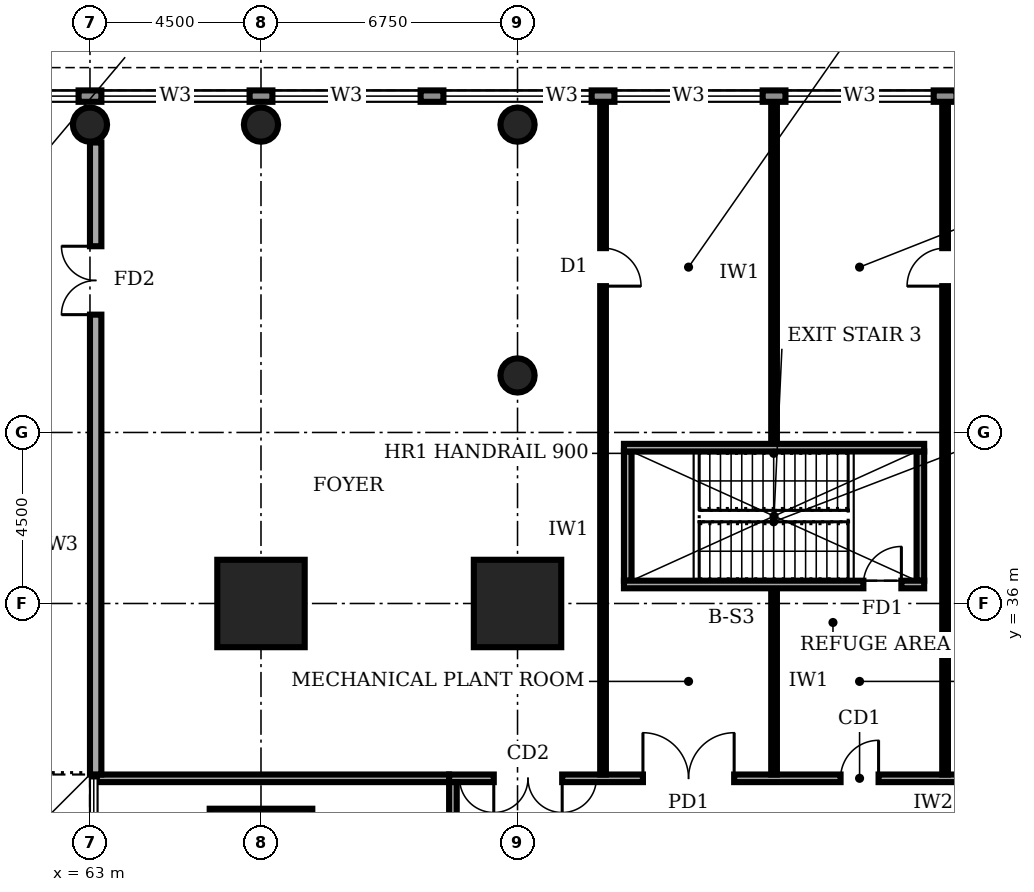
"""IFC4 building model, lengths in metres.
Left out: names, types, materials, properties, quantities, classifications, styles, units other than length and angle.
Written with IfcOpenShell. Run it as: python <this file> out.ifc"""

import sys

from ifc_helpers import new_model, si_unit, direction, frame, frame_2d, origin, origin_2d, place, context, subcontext, project, spatial, rectangle, circle, extrude, element, fill, save


model = new_model("IFC4")
c1 = context("Model", 3, precision=1e-05, world=origin(), true_north=direction((0.0, 1.0)))
c2 = subcontext(c1, "Body", "Model", "MODEL_VIEW")
j1 = project(units=[si_unit("LENGTHUNIT", "METRE"), si_unit("PLANEANGLEUNIT", "RADIAN")], contexts=[c1])
p1 = place(None, origin())
s1 = spatial("IfcSite", under=j1, at=p1, CompositionType="ELEMENT")
p2 = place(p1, origin())
s2 = spatial("IfcBuilding", under=s1, at=p2, CompositionType="ELEMENT")
p3 = place(p2, frame((0.0, 0.0, 16.0)))
s3 = spatial("IfcBuildingStorey", under=s2, at=p3, CompositionType="ELEMENT", Elevation=16.0)
p4 = place(p3, frame((67.5, 29.25, 0.0), z_axis=(0.0, 0.0, 1.0), x_axis=(1.0, 0.0, 0.0)))
e1 = element("IfcColumn", 1, at=p4, inside=s3, PredefinedType="COLUMN", context=c2, shape_type="SweptSolid", body=[
    extrude(rectangle(XDim=2.7, YDim=2.7, at=origin_2d()), origin(), (0.0, 0.0, 1.0), 5.0),
])
for number, where, z_axis, x_axis in (
    (2, (67.5, 36.0, 0.0), (0.0, 0.0, 1.0), (1.0, 0.0, 0.0)),
    (3, (74.25, 36.0, 0.0), (0.0, 0.0, 1.0), (1.0, 0.0, 0.0)),
):
    element("IfcColumn", number, at=place(p3, frame(where, z_axis=z_axis, x_axis=x_axis)), inside=s3, PredefinedType="COLUMN", context=c2, shape_type="SweptSolid", body=[
        extrude(rectangle(XDim=2.3, YDim=2.3, at=origin_2d()), origin(), (0.0, 0.0, 1.0), 5.0),
    ])
for number, where, z_axis, x_axis in (
    (4, (74.25, 42.0, 0.0), (0.0, 0.0, 1.0), (1.0, 0.0, 0.0)),
    (5, (63.0, 48.6, 0.0), (0.0, 0.0, 1.0), (1.0, 0.0, 0.0)),
    (6, (67.5, 48.6, 0.0), (0.0, 0.0, 1.0), (1.0, 0.0, 0.0)),
    (7, (74.25, 48.6, 0.0), (0.0, 0.0, 1.0), (1.0, 0.0, 0.0)),
):
    element("IfcColumn", number, at=place(p3, frame(where, z_axis=z_axis, x_axis=x_axis)), inside=s3, PredefinedType="COLUMN", context=c2, shape_type="SweptSolid", body=[
        extrude(circle(Radius=0.45, at=origin_2d()), origin(), (0.0, 0.0, 1.0), 5.0),
    ])
p5 = place(p3, frame((98.98, 49.35, 0.0), z_axis=(0.0, 0.0, 1.0), x_axis=(-1.0, 0.0, 0.0)))
e8 = element("IfcWall", 8, at=p5, inside=s3, PredefinedType="STANDARD", context=c2, shape_type="SweptSolid", body=[
    extrude(rectangle(XDim=98.96, YDim=0.3, at=frame_2d((49.48, 0.0))), origin(), (0.0, 0.0, 1.0), 4.7),
])
p6 = place(p5, frame((94.78, 0.0, 0.95)))
e9 = element("IfcOpeningElement", 9, at=p6, cuts=e8, PredefinedType="OPENING", context=c2, shape_type="SweptSolid", body=[
    extrude(rectangle(XDim=3.9, YDim=1.8, at=frame_2d((1.95, 0.9))), frame((0.0, 0.16, 0.0), z_axis=(0.0, -1.0, 0.0), x_axis=(1.0, 0.0, 0.0)), (0.0, 0.0, 1.0), 0.32),
])
p7 = place(p5, frame((90.28, 0.0, 0.95)))
e10 = element("IfcOpeningElement", 10, at=p7, cuts=e8, PredefinedType="OPENING", context=c2, shape_type="SweptSolid", body=[
    extrude(rectangle(XDim=3.9, YDim=1.8, at=frame_2d((1.95, 0.9))), frame((0.0, 0.16, 0.0), z_axis=(0.0, -1.0, 0.0), x_axis=(1.0, 0.0, 0.0)), (0.0, 0.0, 1.0), 0.32),
])
p8 = place(p5, frame((85.78, 0.0, 0.95)))
e11 = element("IfcOpeningElement", 11, at=p8, cuts=e8, PredefinedType="OPENING", context=c2, shape_type="SweptSolid", body=[
    extrude(rectangle(XDim=3.9, YDim=1.8, at=frame_2d((1.95, 0.9))), frame((0.0, 0.16, 0.0), z_axis=(0.0, -1.0, 0.0), x_axis=(1.0, 0.0, 0.0)), (0.0, 0.0, 1.0), 0.32),
])
p9 = place(p5, frame((81.28, 0.0, 0.95)))
e12 = element("IfcOpeningElement", 12, at=p9, cuts=e8, PredefinedType="OPENING", context=c2, shape_type="SweptSolid", body=[
    extrude(rectangle(XDim=3.9, YDim=1.8, at=frame_2d((1.95, 0.9))), frame((0.0, 0.16, 0.0), z_axis=(0.0, -1.0, 0.0), x_axis=(1.0, 0.0, 0.0)), (0.0, 0.0, 1.0), 0.32),
])
p10 = place(p5, frame((76.78, 0.0, 0.95)))
e13 = element("IfcOpeningElement", 13, at=p10, cuts=e8, PredefinedType="OPENING", context=c2, shape_type="SweptSolid", body=[
    extrude(rectangle(XDim=3.9, YDim=1.8, at=frame_2d((1.95, 0.9))), frame((0.0, 0.16, 0.0), z_axis=(0.0, -1.0, 0.0), x_axis=(1.0, 0.0, 0.0)), (0.0, 0.0, 1.0), 0.32),
])
p11 = place(p5, frame((72.28, 0.0, 0.95)))
e14 = element("IfcOpeningElement", 14, at=p11, cuts=e8, PredefinedType="OPENING", context=c2, shape_type="SweptSolid", body=[
    extrude(rectangle(XDim=3.9, YDim=1.8, at=frame_2d((1.95, 0.9))), frame((0.0, 0.16, 0.0), z_axis=(0.0, -1.0, 0.0), x_axis=(1.0, 0.0, 0.0)), (0.0, 0.0, 1.0), 0.32),
])
p12 = place(p5, frame((67.78, 0.0, 0.95)))
e15 = element("IfcOpeningElement", 15, at=p12, cuts=e8, PredefinedType="OPENING", context=c2, shape_type="SweptSolid", body=[
    extrude(rectangle(XDim=3.9, YDim=1.8, at=frame_2d((1.95, 0.9))), frame((0.0, 0.16, 0.0), z_axis=(0.0, -1.0, 0.0), x_axis=(1.0, 0.0, 0.0)), (0.0, 0.0, 1.0), 0.32),
])
p13 = place(p5, frame((63.28, 0.0, 0.95)))
e16 = element("IfcOpeningElement", 16, at=p13, cuts=e8, PredefinedType="OPENING", context=c2, shape_type="SweptSolid", body=[
    extrude(rectangle(XDim=3.9, YDim=1.8, at=frame_2d((1.95, 0.9))), frame((0.0, 0.16, 0.0), z_axis=(0.0, -1.0, 0.0), x_axis=(1.0, 0.0, 0.0)), (0.0, 0.0, 1.0), 0.32),
])
p14 = place(p5, frame((58.78, 0.0, 0.95)))
e17 = element("IfcOpeningElement", 17, at=p14, cuts=e8, PredefinedType="OPENING", context=c2, shape_type="SweptSolid", body=[
    extrude(rectangle(XDim=3.9, YDim=1.8, at=frame_2d((1.95, 0.9))), frame((0.0, 0.16, 0.0), z_axis=(0.0, -1.0, 0.0), x_axis=(1.0, 0.0, 0.0)), (0.0, 0.0, 1.0), 0.32),
])
p15 = place(p5, frame((54.28, 0.0, 0.95)))
e18 = element("IfcOpeningElement", 18, at=p15, cuts=e8, PredefinedType="OPENING", context=c2, shape_type="SweptSolid", body=[
    extrude(rectangle(XDim=3.9, YDim=1.8, at=frame_2d((1.95, 0.9))), frame((0.0, 0.16, 0.0), z_axis=(0.0, -1.0, 0.0), x_axis=(1.0, 0.0, 0.0)), (0.0, 0.0, 1.0), 0.32),
])
p16 = place(p5, frame((49.78, 0.0, 0.95)))
e19 = element("IfcOpeningElement", 19, at=p16, cuts=e8, PredefinedType="OPENING", context=c2, shape_type="SweptSolid", body=[
    extrude(rectangle(XDim=3.9, YDim=1.8, at=frame_2d((1.95, 0.9))), frame((0.0, 0.16, 0.0), z_axis=(0.0, -1.0, 0.0), x_axis=(1.0, 0.0, 0.0)), (0.0, 0.0, 1.0), 0.32),
])
p17 = place(p5, frame((45.28, 0.0, 0.95)))
e20 = element("IfcOpeningElement", 20, at=p17, cuts=e8, PredefinedType="OPENING", context=c2, shape_type="SweptSolid", body=[
    extrude(rectangle(XDim=3.9, YDim=1.8, at=frame_2d((1.95, 0.9))), frame((0.0, 0.16, 0.0), z_axis=(0.0, -1.0, 0.0), x_axis=(1.0, 0.0, 0.0)), (0.0, 0.0, 1.0), 0.32),
])
p18 = place(p5, frame((40.78, 0.0, 0.95)))
e21 = element("IfcOpeningElement", 21, at=p18, cuts=e8, PredefinedType="OPENING", context=c2, shape_type="SweptSolid", body=[
    extrude(rectangle(XDim=3.9, YDim=1.8, at=frame_2d((1.95, 0.9))), frame((0.0, 0.16, 0.0), z_axis=(0.0, -1.0, 0.0), x_axis=(1.0, 0.0, 0.0)), (0.0, 0.0, 1.0), 0.32),
])
p19 = place(p5, frame((36.28, 0.0, 0.95)))
e22 = element("IfcOpeningElement", 22, at=p19, cuts=e8, PredefinedType="OPENING", context=c2, shape_type="SweptSolid", body=[
    extrude(rectangle(XDim=3.9, YDim=1.8, at=frame_2d((1.95, 0.9))), frame((0.0, 0.16, 0.0), z_axis=(0.0, -1.0, 0.0), x_axis=(1.0, 0.0, 0.0)), (0.0, 0.0, 1.0), 0.32),
])
p20 = place(p5, frame((31.78, 0.0, 0.95)))
e23 = element("IfcOpeningElement", 23, at=p20, cuts=e8, PredefinedType="OPENING", context=c2, shape_type="SweptSolid", body=[
    extrude(rectangle(XDim=3.9, YDim=1.8, at=frame_2d((1.95, 0.9))), frame((0.0, 0.16, 0.0), z_axis=(0.0, -1.0, 0.0), x_axis=(1.0, 0.0, 0.0)), (0.0, 0.0, 1.0), 0.32),
])
p21 = place(p5, frame((27.28, 0.0, 0.95)))
e24 = element("IfcOpeningElement", 24, at=p21, cuts=e8, PredefinedType="OPENING", context=c2, shape_type="SweptSolid", body=[
    extrude(rectangle(XDim=3.9, YDim=1.8, at=frame_2d((1.95, 0.9))), frame((0.0, 0.16, 0.0), z_axis=(0.0, -1.0, 0.0), x_axis=(1.0, 0.0, 0.0)), (0.0, 0.0, 1.0), 0.32),
])
p22 = place(p5, frame((22.78, 0.0, 0.95)))
e25 = element("IfcOpeningElement", 25, at=p22, cuts=e8, PredefinedType="OPENING", context=c2, shape_type="SweptSolid", body=[
    extrude(rectangle(XDim=3.9, YDim=1.8, at=frame_2d((1.95, 0.9))), frame((0.0, 0.16, 0.0), z_axis=(0.0, -1.0, 0.0), x_axis=(1.0, 0.0, 0.0)), (0.0, 0.0, 1.0), 0.32),
])
p23 = place(p5, frame((18.28, 0.0, 0.95)))
e26 = element("IfcOpeningElement", 26, at=p23, cuts=e8, PredefinedType="OPENING", context=c2, shape_type="SweptSolid", body=[
    extrude(rectangle(XDim=3.9, YDim=1.8, at=frame_2d((1.95, 0.9))), frame((0.0, 0.16, 0.0), z_axis=(0.0, -1.0, 0.0), x_axis=(1.0, 0.0, 0.0)), (0.0, 0.0, 1.0), 0.32),
])
p24 = place(p5, frame((13.78, 0.0, 0.95)))
e27 = element("IfcOpeningElement", 27, at=p24, cuts=e8, PredefinedType="OPENING", context=c2, shape_type="SweptSolid", body=[
    extrude(rectangle(XDim=3.9, YDim=1.8, at=frame_2d((1.95, 0.9))), frame((0.0, 0.16, 0.0), z_axis=(0.0, -1.0, 0.0), x_axis=(1.0, 0.0, 0.0)), (0.0, 0.0, 1.0), 0.32),
])
p25 = place(p5, frame((9.28, 0.0, 0.95)))
e28 = element("IfcOpeningElement", 28, at=p25, cuts=e8, PredefinedType="OPENING", context=c2, shape_type="SweptSolid", body=[
    extrude(rectangle(XDim=3.9, YDim=1.8, at=frame_2d((1.95, 0.9))), frame((0.0, 0.16, 0.0), z_axis=(0.0, -1.0, 0.0), x_axis=(1.0, 0.0, 0.0)), (0.0, 0.0, 1.0), 0.32),
])
p26 = place(p5, frame((4.78, 0.0, 0.95)))
e29 = element("IfcOpeningElement", 29, at=p26, cuts=e8, PredefinedType="OPENING", context=c2, shape_type="SweptSolid", body=[
    extrude(rectangle(XDim=3.9, YDim=1.8, at=frame_2d((1.95, 0.9))), frame((0.0, 0.16, 0.0), z_axis=(0.0, -1.0, 0.0), x_axis=(1.0, 0.0, 0.0)), (0.0, 0.0, 1.0), 0.32),
])
p27 = place(p3, frame((89.35, 31.4, 0.0), z_axis=(0.0, 0.0, 1.0), x_axis=(-1.0, 0.0, 0.0)))
e30 = element("IfcWall", 30, at=p27, inside=s3, PredefinedType="SOLIDWALL", context=c2, shape_type="SweptSolid", body=[
    extrude(rectangle(XDim=16.9, YDim=0.2, at=frame_2d((8.45, 0.0))), origin(), (0.0, 0.0, 1.0), 4.7),
])
p28 = place(p27, frame((13.925, 0.0, 0.0)))
e31 = element("IfcOpeningElement", 31, at=p28, cuts=e30, PredefinedType="OPENING", context=c2, shape_type="SweptSolid", body=[
    extrude(rectangle(XDim=1.8, YDim=2.1, at=frame_2d((0.9, 1.05))), frame((0.0, 0.11, 0.0), z_axis=(0.0, -1.0, 0.0), x_axis=(1.0, 0.0, 0.0)), (0.0, 0.0, 1.0), 0.22),
])
p29 = place(p27, frame((9.4, 0.0, 0.0)))
e32 = element("IfcOpeningElement", 32, at=p29, cuts=e30, PredefinedType="OPENING", context=c2, shape_type="SweptSolid", body=[
    extrude(rectangle(XDim=2.4, YDim=2.7, at=frame_2d((1.2, 1.35))), frame((0.0, 0.11, 0.0), z_axis=(0.0, -1.0, 0.0), x_axis=(1.0, 0.0, 0.0)), (0.0, 0.0, 1.0), 0.22),
])
p30 = place(p27, frame((0.925, 0.0, 0.0)))
e33 = element("IfcOpeningElement", 33, at=p30, cuts=e30, PredefinedType="OPENING", context=c2, shape_type="SweptSolid", body=[
    extrude(rectangle(XDim=1.8, YDim=2.1, at=frame_2d((0.9, 1.05))), frame((0.0, 0.11, 0.0), z_axis=(0.0, -1.0, 0.0), x_axis=(1.0, 0.0, 0.0)), (0.0, 0.0, 1.0), 0.22),
])
p31 = place(p27, frame((5.6, 0.0, 0.0)))
e34 = element("IfcOpeningElement", 34, at=p31, cuts=e30, PredefinedType="OPENING", context=c2, shape_type="SweptSolid", body=[
    extrude(rectangle(XDim=1.0, YDim=2.1, at=frame_2d((0.5, 1.05))), frame((0.0, 0.11, 0.0), z_axis=(0.0, -1.0, 0.0), x_axis=(1.0, 0.0, 0.0)), (0.0, 0.0, 1.0), 0.22),
])
p32 = place(p3, frame((72.55, 31.3, 0.0), z_axis=(0.0, 0.0, 1.0), x_axis=(0.0, -1.0, 0.0)))
e35 = element("IfcWall", 35, at=p32, inside=s3, PredefinedType="SOLIDWALL", context=c2, shape_type="SweptSolid", body=[
    extrude(rectangle(XDim=22.3, YDim=0.2, at=frame_2d((11.15, 0.0))), origin(), (0.0, 0.0, 1.0), 4.7),
])
p33 = place(p32, frame((17.3, 0.0, 0.0)))
e36 = element("IfcOpeningElement", 36, at=p33, cuts=e35, PredefinedType="OPENING", context=c2, shape_type="SweptSolid", body=[
    extrude(rectangle(XDim=1.0, YDim=2.1, at=frame_2d((0.5, 1.05))), frame((0.0, 0.11, 0.0), z_axis=(0.0, -1.0, 0.0), x_axis=(1.0, 0.0, 0.0)), (0.0, 0.0, 1.0), 0.22),
])
p34 = place(p32, frame((5.65, 0.0, 0.0)))
e37 = element("IfcOpeningElement", 37, at=p34, cuts=e35, PredefinedType="OPENING", context=c2, shape_type="SweptSolid", body=[
    extrude(rectangle(XDim=1.8, YDim=2.1, at=frame_2d((0.9, 1.05))), frame((0.0, 0.11, 0.0), z_axis=(0.0, -1.0, 0.0), x_axis=(1.0, 0.0, 0.0)), (0.0, 0.0, 1.0), 0.22),
])
p35 = place(p3, frame((63.18, 31.4, 0.0), z_axis=(0.0, 0.0, 1.0), x_axis=(1.0, 0.0, 0.0)))
e38 = element("IfcWall", 38, at=p35, inside=s3, PredefinedType="SOLIDWALL", context=c2, shape_type="SweptSolid", body=[
    extrude(rectangle(XDim=9.27, YDim=0.2, at=frame_2d((4.635, 0.0))), origin(), (0.0, 0.0, 1.0), 4.7),
])
p36 = place(p3, frame((76.5, 31.5, 0.0), z_axis=(0.0, 0.0, 1.0), x_axis=(0.0, 1.0, 0.0)))
e39 = element("IfcWall", 39, at=p36, inside=s3, PredefinedType="PARTITIONING", context=c2, shape_type="SweptSolid", body=[
    extrude(rectangle(XDim=17.7, YDim=0.15, at=frame_2d((8.85, 0.0))), origin(), (0.0, 0.0, 1.0), 4.7),
])
p37 = place(p36, frame((12.85, 0.0, 0.0)))
e40 = element("IfcOpeningElement", 40, at=p37, cuts=e39, PredefinedType="OPENING", context=c2, shape_type="SweptSolid", body=[
    extrude(rectangle(XDim=1.0, YDim=2.1, at=frame_2d((0.5, 1.05))), frame((0.0, 0.085, 0.0), z_axis=(0.0, -1.0, 0.0), x_axis=(1.0, 0.0, 0.0)), (0.0, 0.0, 1.0), 0.17),
])
p38 = place(p3, frame((81.0, 31.5, 0.0), z_axis=(0.0, 0.0, 1.0), x_axis=(0.0, 1.0, 0.0)))
e41 = element("IfcWall", 41, at=p38, inside=s3, PredefinedType="PARTITIONING", context=c2, shape_type="SweptSolid", body=[
    extrude(rectangle(XDim=4.9, YDim=0.15, at=frame_2d((2.45, 0.0))), origin(), (0.0, 0.0, 1.0), 4.7),
])
p39 = place(p3, frame((81.0, 40.2, 0.0), z_axis=(0.0, 0.0, 1.0), x_axis=(0.0, 1.0, 0.0)))
e42 = element("IfcWall", 42, at=p39, inside=s3, PredefinedType="PARTITIONING", context=c2, shape_type="SweptSolid", body=[
    extrude(rectangle(XDim=9.0, YDim=0.15, at=frame_2d((4.5, 0.0))), origin(), (0.0, 0.0, 1.0), 4.7),
])
p40 = place(p3, frame((85.5, 31.5, 0.0), z_axis=(0.0, 0.0, 1.0), x_axis=(0.0, 1.0, 0.0)))
e43 = element("IfcWall", 43, at=p40, inside=s3, PredefinedType="PARTITIONING", context=c2, shape_type="SweptSolid", body=[
    extrude(rectangle(XDim=17.7, YDim=0.15, at=frame_2d((8.85, 0.0))), origin(), (0.0, 0.0, 1.0), 4.7),
])
p41 = place(p40, frame((12.85, 0.0, 0.0)))
e44 = element("IfcOpeningElement", 44, at=p41, cuts=e43, PredefinedType="OPENING", context=c2, shape_type="SweptSolid", body=[
    extrude(rectangle(XDim=1.0, YDim=2.1, at=frame_2d((0.5, 1.05))), frame((0.0, 0.085, 0.0), z_axis=(0.0, -1.0, 0.0), x_axis=(1.0, 0.0, 0.0)), (0.0, 0.0, 1.0), 0.17),
])
p42 = place(p3, frame((77.05, 36.5, 0.0), z_axis=(0.0, 0.0, 1.0), x_axis=(1.0, 0.0, 0.0)))
e45 = element("IfcWall", 45, at=p42, inside=s3, PredefinedType="SOLIDWALL", context=c2, shape_type="SweptSolid", body=[
    extrude(rectangle(XDim=7.9, YDim=0.2, at=frame_2d((3.95, 0.0))), origin(), (0.0, 0.0, 1.0), 4.7),
])
p43 = place(p42, frame((6.3, 0.0, 0.0)))
e46 = element("IfcOpeningElement", 46, at=p43, cuts=e45, PredefinedType="OPENING", context=c2, shape_type="SweptSolid", body=[
    extrude(rectangle(XDim=1.0, YDim=2.1, at=frame_2d((0.5, 1.05))), frame((0.0, 0.11, 0.0), z_axis=(0.0, -1.0, 0.0), x_axis=(1.0, 0.0, 0.0)), (0.0, 0.0, 1.0), 0.22),
])
p44 = place(p3, frame((77.05, 40.1, 0.0), z_axis=(0.0, 0.0, 1.0), x_axis=(1.0, 0.0, 0.0)))
e47 = element("IfcWall", 47, at=p44, inside=s3, PredefinedType="SOLIDWALL", context=c2, shape_type="SweptSolid", body=[
    extrude(rectangle(XDim=7.9, YDim=0.2, at=frame_2d((3.95, 0.0))), origin(), (0.0, 0.0, 1.0), 4.7),
])
for number, where, z_axis, x_axis in (
    (48, (77.15, 36.6, 0.0), (0.0, 0.0, 1.0), (0.0, 1.0, 0.0)),
    (49, (84.85, 36.6, 0.0), (0.0, 0.0, 1.0), (0.0, 1.0, 0.0)),
):
    element("IfcWall", number, at=place(p3, frame(where, z_axis=z_axis, x_axis=x_axis)), inside=s3, PredefinedType="SOLIDWALL", context=c2, shape_type="SweptSolid", body=[
        extrude(rectangle(XDim=3.4, YDim=0.2, at=frame_2d((1.7, 0.0))), origin(), (0.0, 0.0, 1.0), 4.7),
    ])
p45 = place(p3, frame((63.15, 31.5, 0.0), z_axis=(0.0, 0.0, 1.0), x_axis=(0.0, 1.0, 0.0)))
e50 = element("IfcWall", 50, at=p45, inside=s3, PredefinedType="SOLIDWALL", context=c2, shape_type="SweptSolid", body=[
    extrude(rectangle(XDim=16.63, YDim=0.3, at=frame_2d((8.315, 0.0))), origin(), (0.0, 0.0, 1.0), 4.7),
])
p46 = place(p45, frame((12.1, 0.0, 0.0)))
e51 = element("IfcOpeningElement", 51, at=p46, cuts=e50, PredefinedType="OPENING", context=c2, shape_type="SweptSolid", body=[
    extrude(rectangle(XDim=1.8, YDim=2.1, at=frame_2d((0.9, 1.05))), frame((0.0, 0.16, 0.0), z_axis=(0.0, -1.0, 0.0), x_axis=(1.0, 0.0, 0.0)), (0.0, 0.0, 1.0), 0.32),
])
p47 = place(p19, origin())
e52 = element("IfcWindow", 52, at=p47, inside=s3, PartitioningType="SINGLE_PANEL", PredefinedType="WINDOW", context=c2, shape_type="SweptSolid", body=[
    extrude(rectangle(XDim=3.9, YDim=1.8, at=frame_2d((1.95, 0.9))), frame((0.0, 0.03, 0.0), z_axis=(0.0, -1.0, 0.0), x_axis=(1.0, 0.0, 0.0)), (0.0, 0.0, 1.0), 0.06),
])
fill(e22, e52)
p48 = place(p20, origin())
e53 = element("IfcWindow", 53, at=p48, inside=s3, PartitioningType="SINGLE_PANEL", PredefinedType="WINDOW", context=c2, shape_type="SweptSolid", body=[
    extrude(rectangle(XDim=3.9, YDim=1.8, at=frame_2d((1.95, 0.9))), frame((0.0, 0.03, 0.0), z_axis=(0.0, -1.0, 0.0), x_axis=(1.0, 0.0, 0.0)), (0.0, 0.0, 1.0), 0.06),
])
fill(e23, e53)
p49 = place(p21, origin())
e54 = element("IfcWindow", 54, at=p49, inside=s3, PartitioningType="SINGLE_PANEL", PredefinedType="WINDOW", context=c2, shape_type="SweptSolid", body=[
    extrude(rectangle(XDim=3.9, YDim=1.8, at=frame_2d((1.95, 0.9))), frame((0.0, 0.03, 0.0), z_axis=(0.0, -1.0, 0.0), x_axis=(1.0, 0.0, 0.0)), (0.0, 0.0, 1.0), 0.06),
])
fill(e24, e54)
p50 = place(p22, origin())
e55 = element("IfcWindow", 55, at=p50, inside=s3, PartitioningType="SINGLE_PANEL", PredefinedType="WINDOW", context=c2, shape_type="SweptSolid", body=[
    extrude(rectangle(XDim=3.9, YDim=1.8, at=frame_2d((1.95, 0.9))), frame((0.0, 0.03, 0.0), z_axis=(0.0, -1.0, 0.0), x_axis=(1.0, 0.0, 0.0)), (0.0, 0.0, 1.0), 0.06),
])
fill(e25, e55)
p51 = place(p23, origin())
e56 = element("IfcWindow", 56, at=p51, inside=s3, PartitioningType="SINGLE_PANEL", PredefinedType="WINDOW", context=c2, shape_type="SweptSolid", body=[
    extrude(rectangle(XDim=3.9, YDim=1.8, at=frame_2d((1.95, 0.9))), frame((0.0, 0.03, 0.0), z_axis=(0.0, -1.0, 0.0), x_axis=(1.0, 0.0, 0.0)), (0.0, 0.0, 1.0), 0.06),
])
fill(e26, e56)
p52 = place(p24, origin())
e57 = element("IfcWindow", 57, at=p52, inside=s3, PartitioningType="SINGLE_PANEL", PredefinedType="WINDOW", context=c2, shape_type="SweptSolid", body=[
    extrude(rectangle(XDim=3.9, YDim=1.8, at=frame_2d((1.95, 0.9))), frame((0.0, 0.03, 0.0), z_axis=(0.0, -1.0, 0.0), x_axis=(1.0, 0.0, 0.0)), (0.0, 0.0, 1.0), 0.06),
])
fill(e27, e57)
p53 = place(p28, origin())
e58 = element("IfcDoor", 58, at=p53, inside=s3, OperationType="DOUBLE_DOOR_SINGLE_SWING", PredefinedType="DOOR", context=c2, shape_type="SweptSolid", body=[
    extrude(rectangle(XDim=1.8, YDim=2.1, at=frame_2d((0.9, 1.05))), frame((0.0, 0.025, 0.0), z_axis=(0.0, -1.0, 0.0), x_axis=(1.0, 0.0, 0.0)), (0.0, 0.0, 1.0), 0.05),
])
fill(e31, e58)
p54 = place(p29, frame((2.4, 0.0, 0.0), z_axis=(0.0, 0.0, 1.0), x_axis=(-1.0, 0.0, 0.0)))
e59 = element("IfcDoor", 59, at=p54, inside=s3, OperationType="DOUBLE_DOOR_SINGLE_SWING", PredefinedType="DOOR", context=c2, shape_type="SweptSolid", body=[
    extrude(rectangle(XDim=2.4, YDim=2.7, at=frame_2d((1.2, 1.35))), frame((0.0, 0.025, 0.0), z_axis=(0.0, -1.0, 0.0), x_axis=(1.0, 0.0, 0.0)), (0.0, 0.0, 1.0), 0.05),
])
fill(e32, e59)
p55 = place(p31, frame((1.0, 0.0, 0.0), z_axis=(0.0, 0.0, 1.0), x_axis=(-1.0, 0.0, 0.0)))
e60 = element("IfcDoor", 60, at=p55, inside=s3, OperationType="SINGLE_SWING_RIGHT", PredefinedType="DOOR", context=c2, shape_type="SweptSolid", body=[
    extrude(rectangle(XDim=1.0, YDim=2.1, at=frame_2d((0.5, 1.05))), frame((0.0, 0.025, 0.0), z_axis=(0.0, -1.0, 0.0), x_axis=(1.0, 0.0, 0.0)), (0.0, 0.0, 1.0), 0.05),
])
fill(e34, e60)
p56 = place(p37, frame((1.0, 0.0, 0.0), z_axis=(0.0, 0.0, 1.0), x_axis=(-1.0, 0.0, 0.0)))
e61 = element("IfcDoor", 61, at=p56, inside=s3, OperationType="SINGLE_SWING_RIGHT", PredefinedType="DOOR", context=c2, shape_type="SweptSolid", body=[
    extrude(rectangle(XDim=1.0, YDim=2.1, at=frame_2d((0.5, 1.05))), frame((0.0, 0.025, 0.0), z_axis=(0.0, -1.0, 0.0), x_axis=(1.0, 0.0, 0.0)), (0.0, 0.0, 1.0), 0.05),
])
fill(e40, e61)
p57 = place(p41, origin())
e62 = element("IfcDoor", 62, at=p57, inside=s3, OperationType="SINGLE_SWING_LEFT", PredefinedType="DOOR", context=c2, shape_type="SweptSolid", body=[
    extrude(rectangle(XDim=1.0, YDim=2.1, at=frame_2d((0.5, 1.05))), frame((0.0, 0.025, 0.0), z_axis=(0.0, -1.0, 0.0), x_axis=(1.0, 0.0, 0.0)), (0.0, 0.0, 1.0), 0.05),
])
fill(e44, e62)
p58 = place(p43, origin())
e63 = element("IfcDoor", 63, at=p58, inside=s3, OperationType="SINGLE_SWING_RIGHT", PredefinedType="DOOR", context=c2, shape_type="SweptSolid", body=[
    extrude(rectangle(XDim=1.0, YDim=2.1, at=frame_2d((0.5, 1.05))), frame((0.0, 0.025, 0.0), z_axis=(0.0, -1.0, 0.0), x_axis=(1.0, 0.0, 0.0)), (0.0, 0.0, 1.0), 0.05),
])
fill(e46, e63)
p59 = place(p46, origin())
e64 = element("IfcDoor", 64, at=p59, inside=s3, OperationType="DOUBLE_DOOR_SINGLE_SWING", PredefinedType="DOOR", context=c2, shape_type="SweptSolid", body=[
    extrude(rectangle(XDim=1.8, YDim=2.1, at=frame_2d((0.9, 1.05))), frame((0.0, 0.025, 0.0), z_axis=(0.0, -1.0, 0.0), x_axis=(1.0, 0.0, 0.0)), (0.0, 0.0, 1.0), 0.05),
])
fill(e51, e64)
save(model, sys.argv[1])
